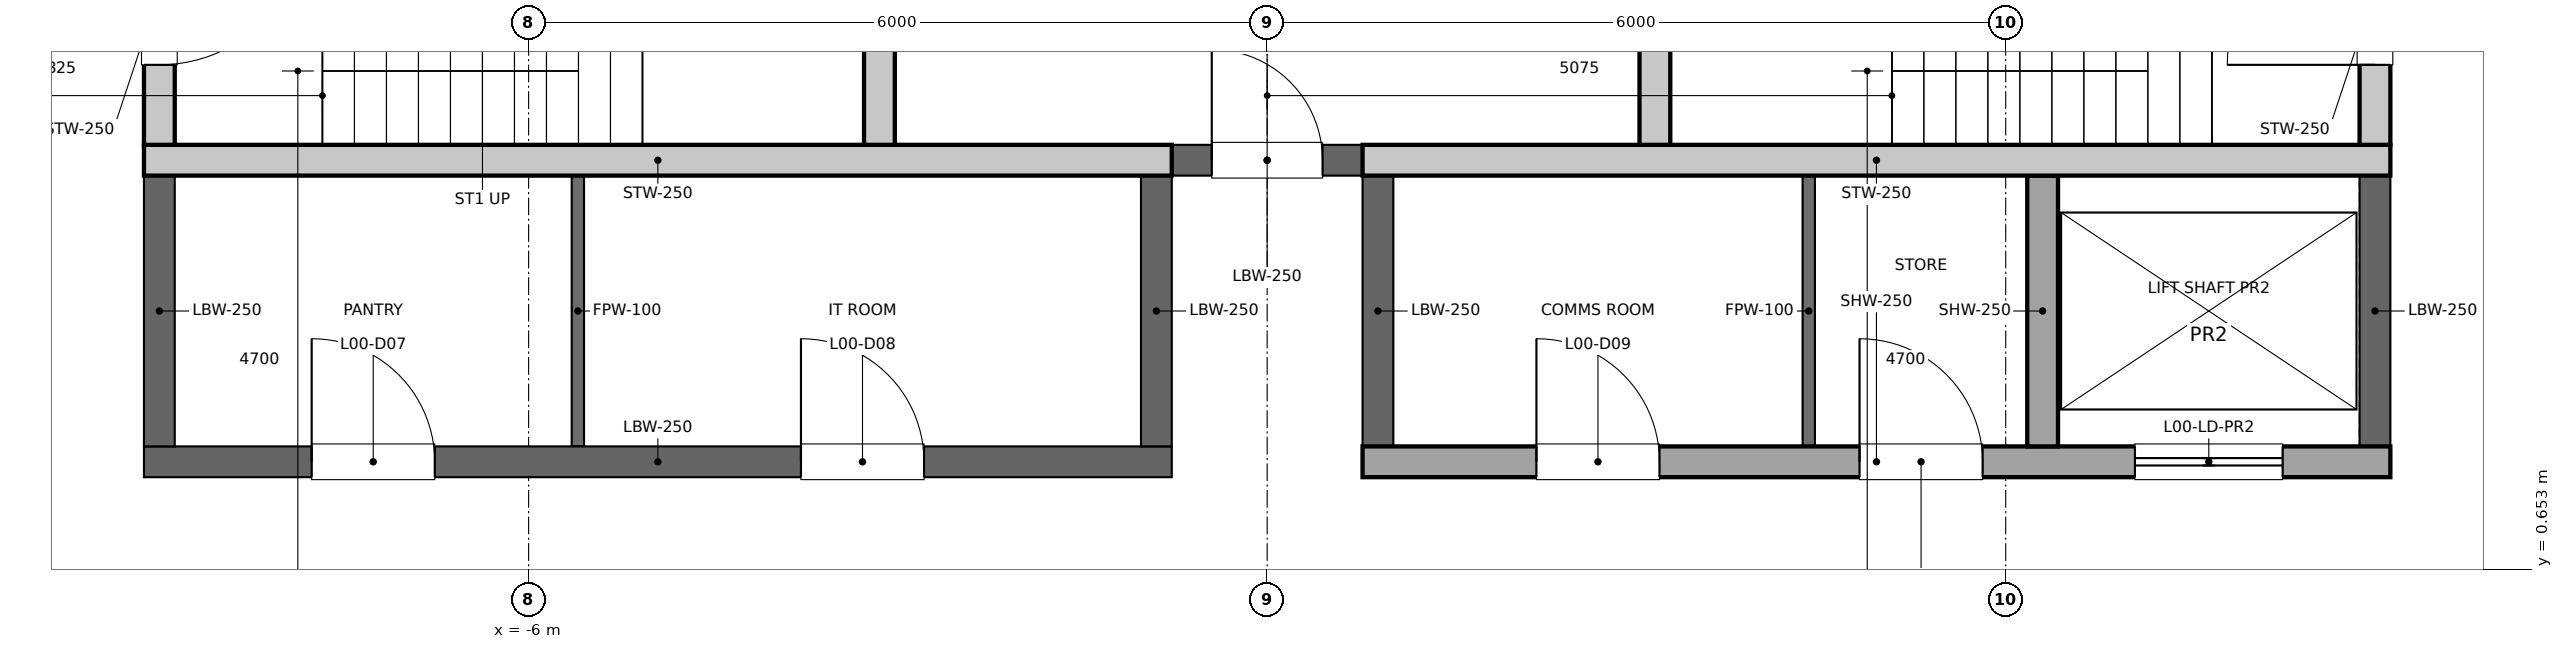
"""IFC4 building model, lengths in metres.
Left out: names, types, materials, properties, quantities, classifications, styles, units other than length and angle.
Written with IfcOpenShell. Run it as: python <this file> out.ifc"""

import sys

from ifc_helpers import new_model, si_unit, direction, frame, frame_2d, origin, place, context, subcontext, project, spatial, rectangle, extrude, element, fill, save


model = new_model("IFC4")
c1 = context("Model", 3, precision=1e-05, world=origin(), true_north=direction((0.0, 1.0)))
c2 = subcontext(c1, "Body", "Model", "MODEL_VIEW")
j1 = project(units=[si_unit("LENGTHUNIT", "METRE"), si_unit("PLANEANGLEUNIT", "RADIAN")], contexts=[c1])
p1 = place(None, origin())
s1 = spatial("IfcSite", under=j1, at=p1, CompositionType="ELEMENT")
p2 = place(p1, origin())
s2 = spatial("IfcBuilding", under=s1, at=p2, CompositionType="ELEMENT")
p3 = place(p2, origin())
s3 = spatial("IfcBuildingStorey", under=s2, at=p3, CompositionType="ELEMENT", Elevation=0.0)
p4 = place(p3, frame((-9.0, 4.1, 0.0), z_axis=(0.0, 0.0, 1.0), x_axis=(0.0, 1.0, 0.0)))
e1 = element("IfcWall", 1, at=p4, inside=s3, PredefinedType="SOLIDWALL", context=c2, shape_type="SweptSolid", body=[
    extrude(rectangle(XDim=2.5, YDim=0.25, at=frame_2d((1.25, 0.0))), origin(), (0.0, 0.0, 1.0), 7.8),
])
p5 = place(p4, frame((0.65, 0.0, 0.0)))
e2 = element("IfcOpeningElement", 2, at=p5, cuts=e1, PredefinedType="OPENING", context=c2, shape_type="SweptSolid", body=[
    extrude(rectangle(XDim=1.2, YDim=2.1, at=frame_2d((0.6, 1.05))), frame((0.0, 0.125, 0.0), z_axis=(0.0, -1.0, 0.0), x_axis=(1.0, 0.0, 0.0)), (0.0, 0.0, 1.0), 0.25),
])
p6 = place(p3, frame((9.0, 4.1, 0.0), z_axis=(0.0, 0.0, 1.0), x_axis=(0.0, 1.0, 0.0)))
e3 = element("IfcWall", 3, at=p6, inside=s3, PredefinedType="SOLIDWALL", context=c2, shape_type="SweptSolid", body=[
    extrude(rectangle(XDim=2.5, YDim=0.25, at=frame_2d((1.25, 0.0))), origin(), (0.0, 0.0, 1.0), 7.8),
])
p7 = place(p6, frame((0.65, 0.0, 0.0)))
e4 = element("IfcOpeningElement", 4, at=p7, cuts=e3, PredefinedType="OPENING", context=c2, shape_type="SweptSolid", body=[
    extrude(rectangle(XDim=1.2, YDim=2.1, at=frame_2d((0.6, 1.05))), frame((0.0, 0.125, 0.0), z_axis=(0.0, -1.0, 0.0), x_axis=(1.0, 0.0, 0.0)), (0.0, 0.0, 1.0), 0.25),
])
for number, where, z_axis, x_axis in (
    (5, (-3.15, 4.1, 0.0), (0.0, 0.0, 1.0), (0.0, 1.0, 0.0)),
    (6, (3.15, 4.1, 0.0), (0.0, 0.0, 1.0), (0.0, 1.0, 0.0)),
):
    element("IfcWall", number, at=place(p3, frame(where, z_axis=z_axis, x_axis=x_axis)), inside=s3, PredefinedType="SOLIDWALL", context=c2, shape_type="SweptSolid", body=[
        extrude(rectangle(XDim=2.5, YDim=0.25, at=frame_2d((1.25, 0.0))), origin(), (0.0, 0.0, 1.0), 7.8),
    ])
p8 = place(p3, frame((-0.775, 3.975, 0.0), z_axis=(0.0, 0.0, 1.0), x_axis=(1.0, 0.0, 0.0)))
e7 = element("IfcWall", 7, at=p8, inside=s3, PredefinedType="PARTITIONING", context=c2, shape_type="SweptSolid", body=[
    extrude(rectangle(XDim=1.55, YDim=0.25, at=frame_2d((0.775, 0.0))), origin(), (0.0, 0.0, 1.0), 7.8),
])
p9 = place(p8, frame((0.325, 0.0, 0.0)))
e8 = element("IfcOpeningElement", 8, at=p9, cuts=e7, PredefinedType="OPENING", context=c2, shape_type="SweptSolid", body=[
    extrude(rectangle(XDim=0.9, YDim=2.1, at=frame_2d((0.45, 1.05))), frame((0.0, 0.125, 0.0), z_axis=(0.0, -1.0, 0.0), x_axis=(1.0, 0.0, 0.0)), (0.0, 0.0, 1.0), 0.25),
])
p10 = place(p3, frame((-9.125, 1.525, 0.0), z_axis=(0.0, 0.0, 1.0), x_axis=(1.0, 0.0, 0.0)))
e9 = element("IfcWall", 9, at=p10, inside=s3, PredefinedType="PARTITIONING", context=c2, shape_type="SweptSolid", body=[
    extrude(rectangle(XDim=8.35, YDim=0.25, at=frame_2d((4.175, 0.0))), origin(), (0.0, 0.0, 1.0), 7.8),
])
p11 = place(p10, frame((1.363, 0.0, 0.0)))
e10 = element("IfcOpeningElement", 10, at=p11, cuts=e9, PredefinedType="OPENING", context=c2, shape_type="SweptSolid", body=[
    extrude(rectangle(XDim=1.0, YDim=2.1, at=frame_2d((0.5, 1.05))), frame((0.0, 0.125, 0.0), z_axis=(0.0, -1.0, 0.0), x_axis=(1.0, 0.0, 0.0)), (0.0, 0.0, 1.0), 0.25),
])
p12 = place(p10, frame((5.337, 0.0, 0.0)))
e11 = element("IfcOpeningElement", 11, at=p12, cuts=e9, PredefinedType="OPENING", context=c2, shape_type="SweptSolid", body=[
    extrude(rectangle(XDim=1.0, YDim=2.1, at=frame_2d((0.5, 1.05))), frame((0.0, 0.125, 0.0), z_axis=(0.0, -1.0, 0.0), x_axis=(1.0, 0.0, 0.0)), (0.0, 0.0, 1.0), 0.25),
])
p13 = place(p3, frame((0.775, 1.525, 0.0), z_axis=(0.0, 0.0, 1.0), x_axis=(1.0, 0.0, 0.0)))
e12 = element("IfcWall", 12, at=p13, inside=s3, PredefinedType="SOLIDWALL", context=c2, shape_type="SweptSolid", body=[
    extrude(rectangle(XDim=8.35, YDim=0.25, at=frame_2d((4.175, 0.0))), origin(), (0.0, 0.0, 1.0), 7.8),
])
p14 = place(p13, frame((6.275, 0.0, 0.0)))
e13 = element("IfcOpeningElement", 13, at=p14, cuts=e12, PredefinedType="OPENING", context=c2, shape_type="SweptSolid", body=[
    extrude(rectangle(XDim=1.2, YDim=2.1, at=frame_2d((0.6, 1.05))), frame((0.0, 0.125, 0.0), z_axis=(0.0, -1.0, 0.0), x_axis=(1.0, 0.0, 0.0)), (0.0, 0.0, 1.0), 0.25),
])
p15 = place(p13, frame((1.413, 0.0, 0.0)))
e14 = element("IfcOpeningElement", 14, at=p15, cuts=e12, PredefinedType="OPENING", context=c2, shape_type="SweptSolid", body=[
    extrude(rectangle(XDim=1.0, YDim=2.1, at=frame_2d((0.5, 1.05))), frame((0.0, 0.125, 0.0), z_axis=(0.0, -1.0, 0.0), x_axis=(1.0, 0.0, 0.0)), (0.0, 0.0, 1.0), 0.25),
])
p16 = place(p13, frame((4.038, 0.0, 0.0)))
e15 = element("IfcOpeningElement", 15, at=p16, cuts=e12, PredefinedType="OPENING", context=c2, shape_type="SweptSolid", body=[
    extrude(rectangle(XDim=1.0, YDim=2.1, at=frame_2d((0.5, 1.05))), frame((0.0, 0.125, 0.0), z_axis=(0.0, -1.0, 0.0), x_axis=(1.0, 0.0, 0.0)), (0.0, 0.0, 1.0), 0.25),
])
p17 = place(p3, frame((6.3, 1.65, 0.0), z_axis=(0.0, 0.0, 1.0), x_axis=(0.0, 1.0, 0.0)))
e16 = element("IfcWall", 16, at=p17, inside=s3, PredefinedType="SOLIDWALL", context=c2, shape_type="SweptSolid", body=[
    extrude(rectangle(XDim=2.2, YDim=0.25, at=frame_2d((1.1, 0.0))), origin(), (0.0, 0.0, 1.0), 7.8),
])
for number, where, z_axis, x_axis in (
    (17, (-9.125, 3.975, 0.0), (0.0, 0.0, 1.0), (1.0, 0.0, 0.0)),
    (18, (0.775, 3.975, 0.0), (0.0, 0.0, 1.0), (1.0, 0.0, 0.0)),
):
    element("IfcWall", number, at=place(p3, frame(where, z_axis=z_axis, x_axis=x_axis)), inside=s3, PredefinedType="SOLIDWALL", context=c2, shape_type="SweptSolid", body=[
        extrude(rectangle(XDim=8.35, YDim=0.25, at=frame_2d((4.175, 0.0))), origin(), (0.0, 0.0, 1.0), 7.8),
    ])
for number, where, z_axis, x_axis in (
    (19, (-9.0, 1.65, 0.0), (0.0, 0.0, 1.0), (0.0, 1.0, 0.0)),
    (20, (-0.9, 1.65, 0.0), (0.0, 0.0, 1.0), (0.0, 1.0, 0.0)),
    (21, (9.0, 1.65, 0.0), (0.0, 0.0, 1.0), (0.0, 1.0, 0.0)),
    (22, (0.9, 1.65, 0.0), (0.0, 0.0, 1.0), (0.0, 1.0, 0.0)),
):
    element("IfcWall", number, at=place(p3, frame(where, z_axis=z_axis, x_axis=x_axis)), inside=s3, PredefinedType="PARTITIONING", context=c2, shape_type="SweptSolid", body=[
        extrude(rectangle(XDim=2.2, YDim=0.25, at=frame_2d((1.1, 0.0))), origin(), (0.0, 0.0, 1.0), 7.8),
    ])
for number, where, z_axis, x_axis in (
    (23, (-5.6, 1.65, 0.0), (0.0, 0.0, 1.0), (0.0, 1.0, 0.0)),
    (24, (4.4, 1.65, 0.0), (0.0, 0.0, 1.0), (0.0, 1.0, 0.0)),
):
    element("IfcWall", number, at=place(p3, frame(where, z_axis=z_axis, x_axis=x_axis)), inside=s3, PredefinedType="PARTITIONING", context=c2, shape_type="SweptSolid", body=[
        extrude(rectangle(XDim=2.2, YDim=0.1, at=frame_2d((1.1, 0.0))), origin(), (0.0, 0.0, 1.0), 7.8),
    ])
p18 = place(p14, origin())
e25 = element("IfcDoor", 25, at=p18, inside=s3, OperationType="DOUBLE_DOOR_SLIDING", PredefinedType="DOOR", context=c2, shape_type="SweptSolid", body=[
    extrude(rectangle(XDim=1.2, YDim=2.1, at=frame_2d((0.6, 1.05))), frame((0.0, 0.025, 0.0), z_axis=(0.0, -1.0, 0.0), x_axis=(1.0, 0.0, 0.0)), (0.0, 0.0, 1.0), 0.05),
])
fill(e13, e25)
p19 = place(p5, origin())
e26 = element("IfcDoor", 26, at=p19, inside=s3, OperationType="SINGLE_SWING_RIGHT", PredefinedType="DOOR", context=c2, shape_type="SweptSolid", body=[
    extrude(rectangle(XDim=1.2, YDim=2.1, at=frame_2d((0.6, 1.05))), frame((0.0, 0.025, 0.0), z_axis=(0.0, -1.0, 0.0), x_axis=(1.0, 0.0, 0.0)), (0.0, 0.0, 1.0), 0.05),
])
fill(e2, e26)
p20 = place(p7, origin())
e27 = element("IfcDoor", 27, at=p20, inside=s3, OperationType="SINGLE_SWING_LEFT", PredefinedType="DOOR", context=c2, shape_type="SweptSolid", body=[
    extrude(rectangle(XDim=1.2, YDim=2.1, at=frame_2d((0.6, 1.05))), frame((0.0, 0.025, 0.0), z_axis=(0.0, -1.0, 0.0), x_axis=(1.0, 0.0, 0.0)), (0.0, 0.0, 1.0), 0.05),
])
fill(e4, e27)
p21 = place(p9, origin())
e28 = element("IfcDoor", 28, at=p21, inside=s3, OperationType="SINGLE_SWING_LEFT", PredefinedType="DOOR", context=c2, shape_type="SweptSolid", body=[
    extrude(rectangle(XDim=0.9, YDim=2.1, at=frame_2d((0.45, 1.05))), frame((0.0, 0.025, 0.0), z_axis=(0.0, -1.0, 0.0), x_axis=(1.0, 0.0, 0.0)), (0.0, 0.0, 1.0), 0.05),
])
fill(e8, e28)
p22 = place(p11, origin())
e29 = element("IfcDoor", 29, at=p22, inside=s3, OperationType="SINGLE_SWING_LEFT", PredefinedType="DOOR", context=c2, shape_type="SweptSolid", body=[
    extrude(rectangle(XDim=1.0, YDim=2.1, at=frame_2d((0.5, 1.05))), frame((0.0, 0.025, 0.0), z_axis=(0.0, -1.0, 0.0), x_axis=(1.0, 0.0, 0.0)), (0.0, 0.0, 1.0), 0.05),
])
fill(e10, e29)
p23 = place(p12, origin())
e30 = element("IfcDoor", 30, at=p23, inside=s3, OperationType="SINGLE_SWING_LEFT", PredefinedType="DOOR", context=c2, shape_type="SweptSolid", body=[
    extrude(rectangle(XDim=1.0, YDim=2.1, at=frame_2d((0.5, 1.05))), frame((0.0, 0.025, 0.0), z_axis=(0.0, -1.0, 0.0), x_axis=(1.0, 0.0, 0.0)), (0.0, 0.0, 1.0), 0.05),
])
fill(e11, e30)
p24 = place(p15, origin())
e31 = element("IfcDoor", 31, at=p24, inside=s3, OperationType="SINGLE_SWING_LEFT", PredefinedType="DOOR", context=c2, shape_type="SweptSolid", body=[
    extrude(rectangle(XDim=1.0, YDim=2.1, at=frame_2d((0.5, 1.05))), frame((0.0, 0.025, 0.0), z_axis=(0.0, -1.0, 0.0), x_axis=(1.0, 0.0, 0.0)), (0.0, 0.0, 1.0), 0.05),
])
fill(e14, e31)
p25 = place(p16, origin())
e32 = element("IfcDoor", 32, at=p25, inside=s3, OperationType="SINGLE_SWING_LEFT", PredefinedType="DOOR", context=c2, shape_type="SweptSolid", body=[
    extrude(rectangle(XDim=1.0, YDim=2.1, at=frame_2d((0.5, 1.05))), frame((0.0, 0.025, 0.0), z_axis=(0.0, -1.0, 0.0), x_axis=(1.0, 0.0, 0.0)), (0.0, 0.0, 1.0), 0.05),
])
fill(e15, e32)
save(model, sys.argv[1])
